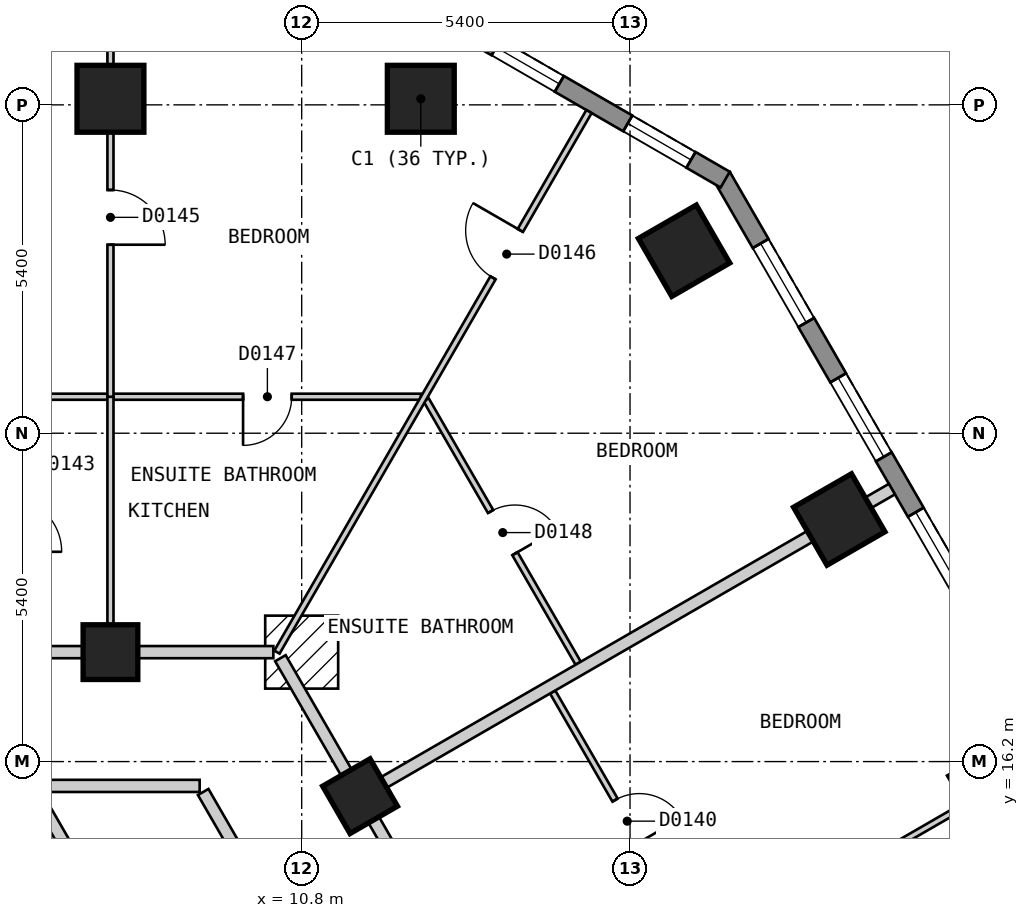
"""IFC4 building model, lengths in metres.
Left out: names, types, materials, properties, quantities, classifications, styles, units other than length and angle.
Written with IfcOpenShell. Run it as: python <this file> out.ifc"""

import sys

from ifc_helpers import new_model, si_unit, direction, frame, frame_2d, origin, origin_2d, place, context, subcontext, project, spatial, polyline, rectangle, outline, extrude, element, fill, save


model = new_model("IFC4")
c1 = context("Model", 3, precision=1e-05, world=origin(), true_north=direction((0.0, 1.0)))
c2 = subcontext(c1, "Body", "Model", "MODEL_VIEW")
j1 = project(units=[si_unit("LENGTHUNIT", "METRE"), si_unit("PLANEANGLEUNIT", "RADIAN")], contexts=[c1])
p1 = place(None, origin())
s1 = spatial("IfcSite", under=j1, at=p1, CompositionType="ELEMENT")
p2 = place(p1, origin())
s2 = spatial("IfcBuilding", under=s1, at=p2, CompositionType="ELEMENT")
p3 = place(p2, frame((0.0, 0.0, 23.4)))
s3 = spatial("IfcBuildingStorey", under=s2, at=p3, CompositionType="ELEMENT", Elevation=23.4)
for number, where, z_axis, x_axis in (
    (1, (12.759, 27.1, 0.0), (0.0, 0.0, 1.0), (-1.0, 0.0, 0.0)),
    (2, (7.655, 27.1, 0.0), (0.0, 0.0, 1.0), (-1.0, 0.0, 0.0)),
    (3, (22.193, 15.761, 0.0), (0.0, 0.0, 1.0), (-0.5, 0.866, 0.0)),
    (4, (19.641, 20.181, 0.0), (0.0, 0.0, 1.0), (-0.5, 0.866, 0.0)),
    (5, (17.089, 24.601, 0.0), (0.0, 0.0, 1.0), (-0.5, 0.866, 0.0)),
):
    element("IfcColumn", number, at=place(p3, frame(where, z_axis=z_axis, x_axis=x_axis)), inside=s3, PredefinedType="COLUMN", context=c2, shape_type="SweptSolid", body=[
        extrude(rectangle(XDim=1.1, YDim=1.1, at=origin_2d()), origin(), (0.0, 0.0, 1.0), 3.0),
    ])
for number, where, z_axis, x_axis in (
    (6, (11.76, 15.631, 0.0), (0.0, 0.0, 1.0), (-0.5, 0.866, 0.0)),
    (7, (7.655, 18.0, 0.0), (0.0, 0.0, 1.0), (-1.0, 0.0, 0.0)),
):
    element("IfcColumn", number, at=place(p3, frame(where, z_axis=z_axis, x_axis=x_axis)), inside=s3, PredefinedType="COLUMN", context=c2, shape_type="SweptSolid", body=[
        extrude(rectangle(XDim=0.9, YDim=0.9, at=origin_2d()), origin(), (0.0, 0.0, 1.0), 3.0),
    ])
p4 = place(p3, frame((31.22, 2.425, 0.0), z_axis=(0.0, 0.0, 1.0), x_axis=(-0.500001938803, 0.866024284413, 0.0)))
e8 = element("IfcWall", 8, at=p4, inside=s3, PredefinedType="SOLIDWALL", context=c2, shape_type="SweptSolid", body=[
    extrude(outline(polyline([(0.0, -0.15), (27.02, -0.15), (26.94, 0.15), (0.08, 0.15), (0.0, -0.15)])), origin(), (0.0, 0.0, 1.0), 2.7),
])
p5 = place(p4, frame((1.277, 0.0, 0.15)))
e9 = element("IfcOpeningElement", 9, at=p5, cuts=e8, PredefinedType="OPENING", context=c2, shape_type="SweptSolid", body=[
    extrude(rectangle(XDim=1.5, YDim=2.1, at=frame_2d((0.75, 1.05))), frame((0.0, 0.16, 0.0), z_axis=(0.0, -1.0, 0.0), x_axis=(1.0, 0.0, 0.0)), (0.0, 0.0, 1.0), 0.32),
])
p6 = place(p4, frame((3.829, 0.0, 0.15)))
e10 = element("IfcOpeningElement", 10, at=p6, cuts=e8, PredefinedType="OPENING", context=c2, shape_type="SweptSolid", body=[
    extrude(rectangle(XDim=1.5, YDim=2.1, at=frame_2d((0.75, 1.05))), frame((0.0, 0.16, 0.0), z_axis=(0.0, -1.0, 0.0), x_axis=(1.0, 0.0, 0.0)), (0.0, 0.0, 1.0), 0.32),
])
p7 = place(p4, frame((6.382, 0.0, 0.15)))
e11 = element("IfcOpeningElement", 11, at=p7, cuts=e8, PredefinedType="OPENING", context=c2, shape_type="SweptSolid", body=[
    extrude(rectangle(XDim=1.5, YDim=2.1, at=frame_2d((0.75, 1.05))), frame((0.0, 0.16, 0.0), z_axis=(0.0, -1.0, 0.0), x_axis=(1.0, 0.0, 0.0)), (0.0, 0.0, 1.0), 0.32),
])
p8 = place(p4, frame((8.933, 0.0, 0.15)))
e12 = element("IfcOpeningElement", 12, at=p8, cuts=e8, PredefinedType="OPENING", context=c2, shape_type="SweptSolid", body=[
    extrude(rectangle(XDim=1.5, YDim=2.1, at=frame_2d((0.75, 1.05))), frame((0.0, 0.16, 0.0), z_axis=(0.0, -1.0, 0.0), x_axis=(1.0, 0.0, 0.0)), (0.0, 0.0, 1.0), 0.32),
])
p9 = place(p4, frame((11.485, 0.0, 0.15)))
e13 = element("IfcOpeningElement", 13, at=p9, cuts=e8, PredefinedType="OPENING", context=c2, shape_type="SweptSolid", body=[
    extrude(rectangle(XDim=1.5, YDim=2.1, at=frame_2d((0.75, 1.05))), frame((0.0, 0.16, 0.0), z_axis=(0.0, -1.0, 0.0), x_axis=(1.0, 0.0, 0.0)), (0.0, 0.0, 1.0), 0.32),
])
p10 = place(p4, frame((14.037, 0.0, 0.15)))
e14 = element("IfcOpeningElement", 14, at=p10, cuts=e8, PredefinedType="OPENING", context=c2, shape_type="SweptSolid", body=[
    extrude(rectangle(XDim=1.5, YDim=2.1, at=frame_2d((0.75, 1.05))), frame((0.0, 0.16, 0.0), z_axis=(0.0, -1.0, 0.0), x_axis=(1.0, 0.0, 0.0)), (0.0, 0.0, 1.0), 0.32),
])
p11 = place(p4, frame((16.589, 0.0, 0.15)))
e15 = element("IfcOpeningElement", 15, at=p11, cuts=e8, PredefinedType="OPENING", context=c2, shape_type="SweptSolid", body=[
    extrude(rectangle(XDim=1.5, YDim=2.1, at=frame_2d((0.75, 1.05))), frame((0.0, 0.16, 0.0), z_axis=(0.0, -1.0, 0.0), x_axis=(1.0, 0.0, 0.0)), (0.0, 0.0, 1.0), 0.32),
])
p12 = place(p4, frame((19.141, 0.0, 0.15)))
e16 = element("IfcOpeningElement", 16, at=p12, cuts=e8, PredefinedType="OPENING", context=c2, shape_type="SweptSolid", body=[
    extrude(rectangle(XDim=1.5, YDim=2.1, at=frame_2d((0.75, 1.05))), frame((0.0, 0.16, 0.0), z_axis=(0.0, -1.0, 0.0), x_axis=(1.0, 0.0, 0.0)), (0.0, 0.0, 1.0), 0.32),
])
p13 = place(p4, frame((21.693, 0.0, 0.15)))
e17 = element("IfcOpeningElement", 17, at=p13, cuts=e8, PredefinedType="OPENING", context=c2, shape_type="SweptSolid", body=[
    extrude(rectangle(XDim=1.5, YDim=2.1, at=frame_2d((0.75, 1.05))), frame((0.0, 0.16, 0.0), z_axis=(0.0, -1.0, 0.0), x_axis=(1.0, 0.0, 0.0)), (0.0, 0.0, 1.0), 0.32),
])
p14 = place(p4, frame((24.244, 0.0, 0.15)))
e18 = element("IfcOpeningElement", 18, at=p14, cuts=e8, PredefinedType="OPENING", context=c2, shape_type="SweptSolid", body=[
    extrude(rectangle(XDim=1.5, YDim=2.1, at=frame_2d((0.75, 1.05))), frame((0.0, 0.16, 0.0), z_axis=(0.0, -1.0, 0.0), x_axis=(1.0, 0.0, 0.0)), (0.0, 0.0, 1.0), 0.32),
])
p15 = place(p3, frame((17.765, 25.77, 0.0), z_axis=(0.0, 0.0, 1.0), x_axis=(-0.866010750942, 0.50002537861, 0.0)))
e19 = element("IfcWall", 19, at=p15, inside=s3, PredefinedType="SOLIDWALL", context=c2, shape_type="SweptSolid", body=[
    extrude(outline(polyline([(0.0, -0.15), (5.0, -0.15), (4.919, 0.15), (0.08, 0.15), (0.0, -0.15)])), origin(), (0.0, 0.0, 1.0), 2.7),
])
p16 = place(p15, frame((0.65, 0.0, 0.15)))
e20 = element("IfcOpeningElement", 20, at=p16, cuts=e19, PredefinedType="OPENING", context=c2, shape_type="SweptSolid", body=[
    extrude(rectangle(XDim=1.2, YDim=2.1, at=frame_2d((0.6, 1.05))), frame((0.0, 0.16, 0.0), z_axis=(0.0, -1.0, 0.0), x_axis=(1.0, 0.0, 0.0)), (0.0, 0.0, 1.0), 0.32),
])
p17 = place(p15, frame((3.15, 0.0, 0.15)))
e21 = element("IfcOpeningElement", 21, at=p17, cuts=e19, PredefinedType="OPENING", context=c2, shape_type="SweptSolid", body=[
    extrude(rectangle(XDim=1.2, YDim=2.1, at=frame_2d((0.6, 1.05))), frame((0.0, 0.16, 0.0), z_axis=(0.0, -1.0, 0.0), x_axis=(1.0, 0.0, 0.0)), (0.0, 0.0, 1.0), 0.32),
])
p18 = place(p3, frame((6.409, 15.7, 0.0), z_axis=(0.0, 0.0, 1.0), x_axis=(0.499930377127, -0.866065596838, 0.0)))
e22 = element("IfcWall", 22, at=p18, inside=s3, PredefinedType="PARTITIONING", context=c2, shape_type="SweptSolid", body=[
    extrude(rectangle(XDim=8.775, YDim=0.2, at=frame_2d((4.388, 0.0))), origin(), (0.0, 0.0, 1.0), 2.7),
])
p19 = place(p3, frame((9.18, 15.7, 0.0), z_axis=(0.0, 0.0, 1.0), x_axis=(0.500003652032, -0.866023295272, 0.0)))
e23 = element("IfcWall", 23, at=p19, inside=s3, PredefinedType="PARTITIONING", context=c2, shape_type="SweptSolid", body=[
    extrude(rectangle(XDim=18.012, YDim=0.2, at=frame_2d((9.006, 0.0))), origin(), (0.0, 0.0, 1.0), 2.7),
])
p20 = place(p19, frame((8.556, 0.0, 0.0)))
e24 = element("IfcOpeningElement", 24, at=p20, cuts=e23, PredefinedType="OPENING", context=c2, shape_type="SweptSolid", body=[
    extrude(rectangle(XDim=0.9, YDim=2.1, at=frame_2d((0.45, 1.05))), frame((0.0, 0.11, 0.0), z_axis=(0.0, -1.0, 0.0), x_axis=(1.0, 0.0, 0.0)), (0.0, 0.0, 1.0), 0.22),
])
p21 = place(p3, frame((10.45, 17.9, 0.0), z_axis=(0.0, 0.0, 1.0), x_axis=(0.500034352617, -0.866005569383, 0.0)))
e25 = element("IfcWall", 25, at=p21, inside=s3, PredefinedType="PARTITIONING", context=c2, shape_type="SweptSolid", body=[
    extrude(rectangle(XDim=20.553, YDim=0.2, at=frame_2d((10.276, 0.0))), origin(), (0.0, 0.0, 1.0), 2.7),
])
p22 = place(p21, frame((14.903, 0.0, 0.0)))
e26 = element("IfcOpeningElement", 26, at=p22, cuts=e25, PredefinedType="OPENING", context=c2, shape_type="SweptSolid", body=[
    extrude(rectangle(XDim=1.0, YDim=2.1, at=frame_2d((0.5, 1.05))), frame((0.0, 0.11, 0.0), z_axis=(0.0, -1.0, 0.0), x_axis=(1.0, 0.0, 0.0)), (0.0, 0.0, 1.0), 0.22),
])
p23 = place(p21, frame((9.775, 0.0, 0.0)))
e27 = element("IfcOpeningElement", 27, at=p23, cuts=e25, PredefinedType="OPENING", context=c2, shape_type="SweptSolid", body=[
    extrude(rectangle(XDim=1.0, YDim=2.1, at=frame_2d((0.5, 1.05))), frame((0.0, 0.11, 0.0), z_axis=(0.0, -1.0, 0.0), x_axis=(1.0, 0.0, 0.0)), (0.0, 0.0, 1.0), 0.22),
])
p24 = place(p3, frame((6.351, 15.8, 0.0), z_axis=(0.0, 0.0, 1.0), x_axis=(1.0, 0.0, 0.0)))
e28 = element("IfcWall", 28, at=p24, inside=s3, PredefinedType="PARTITIONING", context=c2, shape_type="SweptSolid", body=[
    extrude(rectangle(XDim=2.771, YDim=0.2, at=frame_2d((1.385, 0.0))), origin(), (0.0, 0.0, 1.0), 2.7),
])
p25 = place(p3, frame((-10.276, 18.0, 0.0), z_axis=(0.0, 0.0, 1.0), x_axis=(1.0, 0.0, 0.0)))
e29 = element("IfcWall", 29, at=p25, inside=s3, PredefinedType="PARTITIONING", context=c2, shape_type="SweptSolid", body=[
    extrude(rectangle(XDim=20.61, YDim=0.2, at=frame_2d((10.305, 0.0))), origin(), (0.0, 0.0, 1.0), 2.7),
])
p26 = place(p25, frame((14.879, 0.0, 0.0)))
e30 = element("IfcOpeningElement", 30, at=p26, cuts=e29, PredefinedType="OPENING", context=c2, shape_type="SweptSolid", body=[
    extrude(rectangle(XDim=1.0, YDim=2.1, at=frame_2d((0.5, 1.05))), frame((0.0, 0.11, 0.0), z_axis=(0.0, -1.0, 0.0), x_axis=(1.0, 0.0, 0.0)), (0.0, 0.0, 1.0), 0.22),
])
p27 = place(p25, frame((9.775, 0.0, 0.0)))
e31 = element("IfcOpeningElement", 31, at=p27, cuts=e29, PredefinedType="OPENING", context=c2, shape_type="SweptSolid", body=[
    extrude(rectangle(XDim=1.0, YDim=2.1, at=frame_2d((0.5, 1.05))), frame((0.0, 0.11, 0.0), z_axis=(0.0, -1.0, 0.0), x_axis=(1.0, 0.0, 0.0)), (0.0, 0.0, 1.0), 0.22),
])
p28 = place(p25, frame((4.671, 0.0, 0.0)))
e32 = element("IfcOpeningElement", 32, at=p28, cuts=e29, PredefinedType="OPENING", context=c2, shape_type="SweptSolid", body=[
    extrude(rectangle(XDim=1.0, YDim=2.1, at=frame_2d((0.5, 1.05))), frame((0.0, 0.11, 0.0), z_axis=(0.0, -1.0, 0.0), x_axis=(1.0, 0.0, 0.0)), (0.0, 0.0, 1.0), 0.22),
])
p29 = place(p25, frame((0.837, 0.0, 0.0)))
e33 = element("IfcOpeningElement", 33, at=p29, cuts=e29, PredefinedType="OPENING", context=c2, shape_type="SweptSolid", body=[
    extrude(rectangle(XDim=0.8, YDim=2.1, at=frame_2d((0.4, 1.05))), frame((0.0, 0.11, 0.0), z_axis=(0.0, -1.0, 0.0), x_axis=(1.0, 0.0, 0.0)), (0.0, 0.0, 1.0), 0.22),
])
p30 = place(p3, frame((14.928, 17.344, 0.0), z_axis=(0.0, 0.0, 1.0), x_axis=(0.499881743012, -0.866093668724, 0.0)))
e34 = element("IfcWall", 34, at=p30, inside=s3, PredefinedType="PARTITIONING", context=c2, shape_type="SweptSolid", body=[
    extrude(rectangle(XDim=4.953, YDim=0.1, at=frame_2d((2.477, 0.0))), origin(), (0.0, 0.0, 1.0), 2.7),
])
p31 = place(p30, frame((2.052, 0.0, 0.0)))
e35 = element("IfcOpeningElement", 35, at=p31, cuts=e34, PredefinedType="OPENING", context=c2, shape_type="SweptSolid", body=[
    extrude(rectangle(XDim=0.8, YDim=2.1, at=frame_2d((0.4, 1.05))), frame((0.0, 0.06, 0.0), z_axis=(0.0, -1.0, 0.0), x_axis=(1.0, 0.0, 0.0)), (0.0, 0.0, 1.0), 0.12),
])
p32 = place(p3, frame((12.846, 22.15, 0.0), z_axis=(0.0, 0.0, 1.0), x_axis=(0.500002715276, -0.866023836113, 0.0)))
e36 = element("IfcWall", 36, at=p32, inside=s3, PredefinedType="PARTITIONING", context=c2, shape_type="SweptSolid", body=[
    extrude(rectangle(XDim=5.002, YDim=0.1, at=frame_2d((2.501, 0.0))), origin(), (0.0, 0.0, 1.0), 2.7),
])
p33 = place(p32, frame((2.122, 0.0, 0.0)))
e37 = element("IfcOpeningElement", 37, at=p33, cuts=e36, PredefinedType="OPENING", context=c2, shape_type="SweptSolid", body=[
    extrude(rectangle(XDim=0.8, YDim=2.1, at=frame_2d((0.4, 1.05))), frame((0.0, 0.06, 0.0), z_axis=(0.0, -1.0, 0.0), x_axis=(1.0, 0.0, 0.0)), (0.0, 0.0, 1.0), 0.12),
])
p34 = place(p3, frame((2.651, 22.2, 0.0), z_axis=(0.0, 0.0, 1.0), x_axis=(1.0, 0.0, 0.0)))
e38 = element("IfcWall", 38, at=p34, inside=s3, PredefinedType="PARTITIONING", context=c2, shape_type="SweptSolid", body=[
    extrude(rectangle(XDim=10.109, YDim=0.1, at=frame_2d((5.055, 0.0))), origin(), (0.0, 0.0, 1.0), 2.7),
])
p35 = place(p34, frame((2.002, 0.0, 0.0)))
e39 = element("IfcOpeningElement", 39, at=p35, cuts=e38, PredefinedType="OPENING", context=c2, shape_type="SweptSolid", body=[
    extrude(rectangle(XDim=0.9, YDim=2.1, at=frame_2d((0.45, 1.05))), frame((0.0, 0.06, 0.0), z_axis=(0.0, -1.0, 0.0), x_axis=(1.0, 0.0, 0.0)), (0.0, 0.0, 1.0), 0.12),
])
p36 = place(p34, frame((7.185, 0.0, 0.0)))
e40 = element("IfcOpeningElement", 40, at=p36, cuts=e38, PredefinedType="OPENING", context=c2, shape_type="SweptSolid", body=[
    extrude(rectangle(XDim=0.8, YDim=2.1, at=frame_2d((0.4, 1.05))), frame((0.0, 0.06, 0.0), z_axis=(0.0, -1.0, 0.0), x_axis=(1.0, 0.0, 0.0)), (0.0, 0.0, 1.0), 0.12),
])
p37 = place(p3, frame((10.393, 18.0, 0.0), z_axis=(0.0, 0.0, 1.0), x_axis=(0.499945497007, 0.866056868816, 0.0)))
e41 = element("IfcWall", 41, at=p37, inside=s3, PredefinedType="PARTITIONING", context=c2, shape_type="SweptSolid", body=[
    extrude(rectangle(XDim=10.265, YDim=0.1, at=frame_2d((5.132, 0.0))), origin(), (0.0, 0.0, 1.0), 2.7),
])
p38 = place(p37, frame((7.108, 0.0, 0.0)))
e42 = element("IfcOpeningElement", 42, at=p38, cuts=e41, PredefinedType="OPENING", context=c2, shape_type="SweptSolid", body=[
    extrude(rectangle(XDim=0.9, YDim=2.1, at=frame_2d((0.45, 1.05))), frame((0.0, 0.06, 0.0), z_axis=(0.0, -1.0, 0.0), x_axis=(1.0, 0.0, 0.0)), (0.0, 0.0, 1.0), 0.12),
])
p39 = place(p3, frame((7.655, 18.1, 0.0), z_axis=(0.0, 0.0, 1.0), x_axis=(0.0, 1.0, 0.0)))
e43 = element("IfcWall", 43, at=p39, inside=s3, PredefinedType="PARTITIONING", context=c2, shape_type="SweptSolid", body=[
    extrude(rectangle(XDim=4.1, YDim=0.1, at=frame_2d((2.05, 0.0))), origin(), (0.0, 0.0, 1.0), 2.7),
])
p40 = place(p3, frame((14.399, 11.261, 0.0), z_axis=(0.0, 0.0, 1.0), x_axis=(0.866022959057, 0.500004234368, 0.0)))
e44 = element("IfcWall", 44, at=p40, inside=s3, PredefinedType="PARTITIONING", context=c2, shape_type="SweptSolid", body=[
    extrude(rectangle(XDim=10.0, YDim=0.1, at=frame_2d((5.0, 0.0))), origin(), (0.0, 0.0, 1.0), 2.7),
])
p41 = place(p40, frame((4.775, 0.0, 0.0)))
e45 = element("IfcOpeningElement", 45, at=p41, cuts=e44, PredefinedType="OPENING", context=c2, shape_type="SweptSolid", body=[
    extrude(rectangle(XDim=0.9, YDim=2.1, at=frame_2d((0.45, 1.05))), frame((0.0, 0.06, 0.0), z_axis=(0.0, -1.0, 0.0), x_axis=(1.0, 0.0, 0.0)), (0.0, 0.0, 1.0), 0.12),
])
p42 = place(p3, frame((11.847, 15.681, 0.0), z_axis=(0.0, 0.0, 1.0), x_axis=(0.866022959057, 0.500004234368, 0.0)))
e46 = element("IfcWall", 46, at=p42, inside=s3, PredefinedType="PARTITIONING", context=c2, shape_type="SweptSolid", body=[
    extrude(rectangle(XDim=10.0, YDim=0.2, at=frame_2d((5.0, 0.0))), origin(), (0.0, 0.0, 1.0), 2.7),
])
p43 = place(p3, frame((7.655, 22.2, 0.0), z_axis=(0.0, 0.0, 1.0), x_axis=(0.0, 1.0, 0.0)))
e47 = element("IfcWall", 47, at=p43, inside=s3, PredefinedType="PARTITIONING", context=c2, shape_type="SweptSolid", body=[
    extrude(rectangle(XDim=5.9, YDim=0.1, at=frame_2d((2.95, 0.0))), origin(), (0.0, 0.0, 1.0), 2.7),
])
p44 = place(p43, frame((2.5, 0.0, 0.0)))
e48 = element("IfcOpeningElement", 48, at=p44, cuts=e47, PredefinedType="OPENING", context=c2, shape_type="SweptSolid", body=[
    extrude(rectangle(XDim=0.9, YDim=2.1, at=frame_2d((0.45, 1.05))), frame((0.0, 0.06, 0.0), z_axis=(0.0, -1.0, 0.0), x_axis=(1.0, 0.0, 0.0)), (0.0, 0.0, 1.0), 0.12),
])
p45 = place(p12, origin())
e49 = element("IfcWindow", 49, at=p45, inside=s3, PartitioningType="SINGLE_PANEL", PredefinedType="WINDOW", context=c2, shape_type="SweptSolid", body=[
    extrude(rectangle(XDim=1.5, YDim=2.1, at=frame_2d((0.75, 1.05))), frame((0.0, 0.03, 0.0), z_axis=(0.0, -1.0, 0.0), x_axis=(1.0, 0.0, 0.0)), (0.0, 0.0, 1.0), 0.06),
])
fill(e16, e49)
p46 = place(p13, origin())
e50 = element("IfcWindow", 50, at=p46, inside=s3, PartitioningType="SINGLE_PANEL", PredefinedType="WINDOW", context=c2, shape_type="SweptSolid", body=[
    extrude(rectangle(XDim=1.5, YDim=2.1, at=frame_2d((0.75, 1.05))), frame((0.0, 0.03, 0.0), z_axis=(0.0, -1.0, 0.0), x_axis=(1.0, 0.0, 0.0)), (0.0, 0.0, 1.0), 0.06),
])
fill(e17, e50)
p47 = place(p14, origin())
e51 = element("IfcWindow", 51, at=p47, inside=s3, PartitioningType="SINGLE_PANEL", PredefinedType="WINDOW", context=c2, shape_type="SweptSolid", body=[
    extrude(rectangle(XDim=1.5, YDim=2.1, at=frame_2d((0.75, 1.05))), frame((0.0, 0.03, 0.0), z_axis=(0.0, -1.0, 0.0), x_axis=(1.0, 0.0, 0.0)), (0.0, 0.0, 1.0), 0.06),
])
fill(e18, e51)
p48 = place(p16, origin())
e52 = element("IfcWindow", 52, at=p48, inside=s3, PartitioningType="SINGLE_PANEL", PredefinedType="WINDOW", context=c2, shape_type="SweptSolid", body=[
    extrude(rectangle(XDim=1.2, YDim=2.1, at=frame_2d((0.6, 1.05))), frame((0.0, 0.03, 0.0), z_axis=(0.0, -1.0, 0.0), x_axis=(1.0, 0.0, 0.0)), (0.0, 0.0, 1.0), 0.06),
])
fill(e20, e52)
p49 = place(p17, origin())
e53 = element("IfcWindow", 53, at=p49, inside=s3, PartitioningType="SINGLE_PANEL", PredefinedType="WINDOW", context=c2, shape_type="SweptSolid", body=[
    extrude(rectangle(XDim=1.2, YDim=2.1, at=frame_2d((0.6, 1.05))), frame((0.0, 0.03, 0.0), z_axis=(0.0, -1.0, 0.0), x_axis=(1.0, 0.0, 0.0)), (0.0, 0.0, 1.0), 0.06),
])
fill(e21, e53)
p50 = place(p31, origin())
e54 = element("IfcDoor", 54, at=p50, inside=s3, OperationType="SINGLE_SWING_RIGHT", PredefinedType="DOOR", context=c2, shape_type="SweptSolid", body=[
    extrude(rectangle(XDim=0.8, YDim=2.1, at=frame_2d((0.4, 1.05))), frame((0.0, 0.025, 0.0), z_axis=(0.0, -1.0, 0.0), x_axis=(1.0, 0.0, 0.0)), (0.0, 0.0, 1.0), 0.05),
])
fill(e35, e54)
p51 = place(p44, origin())
e55 = element("IfcDoor", 55, at=p51, inside=s3, OperationType="SINGLE_SWING_LEFT", PredefinedType="DOOR", context=c2, shape_type="SweptSolid", body=[
    extrude(rectangle(XDim=0.9, YDim=2.1, at=frame_2d((0.45, 1.05))), frame((0.0, 0.025, 0.0), z_axis=(0.0, -1.0, 0.0), x_axis=(1.0, 0.0, 0.0)), (0.0, 0.0, 1.0), 0.05),
])
fill(e48, e55)
p52 = place(p38, origin())
e56 = element("IfcDoor", 56, at=p52, inside=s3, OperationType="SINGLE_SWING_RIGHT", PredefinedType="DOOR", context=c2, shape_type="SweptSolid", body=[
    extrude(rectangle(XDim=0.9, YDim=2.1, at=frame_2d((0.45, 1.05))), frame((0.0, 0.025, 0.0), z_axis=(0.0, -1.0, 0.0), x_axis=(1.0, 0.0, 0.0)), (0.0, 0.0, 1.0), 0.05),
])
fill(e42, e56)
p53 = place(p36, origin())
e57 = element("IfcDoor", 57, at=p53, inside=s3, OperationType="SINGLE_SWING_LEFT", PredefinedType="DOOR", context=c2, shape_type="SweptSolid", body=[
    extrude(rectangle(XDim=0.8, YDim=2.1, at=frame_2d((0.4, 1.05))), frame((0.0, 0.025, 0.0), z_axis=(0.0, -1.0, 0.0), x_axis=(1.0, 0.0, 0.0)), (0.0, 0.0, 1.0), 0.05),
])
fill(e40, e57)
p54 = place(p33, origin())
e58 = element("IfcDoor", 58, at=p54, inside=s3, OperationType="SINGLE_SWING_RIGHT", PredefinedType="DOOR", context=c2, shape_type="SweptSolid", body=[
    extrude(rectangle(XDim=0.8, YDim=2.1, at=frame_2d((0.4, 1.05))), frame((0.0, 0.025, 0.0), z_axis=(0.0, -1.0, 0.0), x_axis=(1.0, 0.0, 0.0)), (0.0, 0.0, 1.0), 0.05),
])
fill(e37, e58)
save(model, sys.argv[1])
